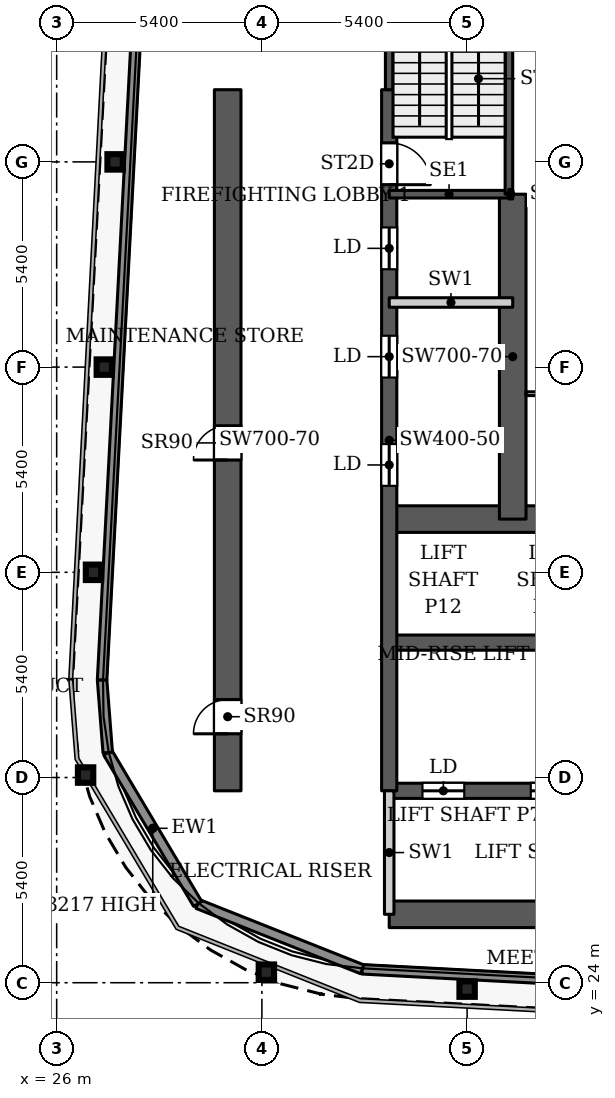
"""IFC4 building model, lengths in metres.
Left out: names, types, materials, properties, quantities, classifications, styles, units other than length and angle.
Written with IfcOpenShell. Run it as: python <this file> out.ifc"""

import sys

from ifc_helpers import new_model, si_unit, direction, frame, frame_2d, origin, origin_2d, place, context, subcontext, project, spatial, rectangle, i_section, extrude, source, transform, mapped, element, fill, save


model = new_model("IFC4")
c1 = context("Model", 3, precision=1e-05, world=origin(), true_north=direction((0.0, 1.0)))
c2 = subcontext(c1, "Body", "Model", "MODEL_VIEW")
j1 = project(units=[si_unit("LENGTHUNIT", "METRE"), si_unit("PLANEANGLEUNIT", "RADIAN")], contexts=[c1])
p1 = place(None, origin())
s1 = spatial("IfcSite", under=j1, at=p1, CompositionType="ELEMENT")
p2 = place(p1, origin())
s2 = spatial("IfcBuilding", under=s1, at=p2, CompositionType="ELEMENT")
p3 = place(p2, frame((0.0, 0.0, 227.9)))
s3 = spatial("IfcBuildingStorey", under=s2, at=p3, CompositionType="ELEMENT", Elevation=227.9)
for number, where, z_axis, x_axis in (
    (1, (36.8, 23.832, 0.0), (0.0, 0.0, 1.0), (1.0, 0.0, 0.0)),
    (2, (31.518, 24.277, 0.0), (0.0, 0.0, 1.0), (1.0, 0.0, 0.0)),
    (3, (26.761, 29.465, 0.0), (0.0, 0.0, 1.0), (1.0, 0.0, 0.0)),
    (4, (26.969, 34.8, 0.0), (0.0, 0.0, 1.0), (1.0, 0.0, 0.0)),
    (5, (27.253, 40.2, 0.0), (0.0, 0.0, 1.0), (1.0, 0.0, 0.0)),
    (6, (27.537, 45.6, 0.0), (0.0, 0.0, 1.0), (1.0, 0.0, 0.0)),
):
    element("IfcColumn", number, at=place(p3, frame(where, z_axis=z_axis, x_axis=x_axis)), inside=s3, PredefinedType="COLUMN", context=c2, shape_type="SweptSolid", body=[
        extrude(i_section(OverallWidth=0.404, OverallDepth=0.407, WebThickness=0.027, FlangeThickness=0.044, FilletRadius=0.012, at=origin_2d()), origin(), (0.0, 0.0, 1.0), 3.9),
    ])
p4 = place(p3, frame((34.75, 25.8, 0.0), z_axis=(0.0, 0.0, 1.0), x_axis=(1.0, 0.0, 0.0)))
e7 = element("IfcWall", 7, at=p4, inside=s3, PredefinedType="SHEAR", context=c2, shape_type="SweptSolid", body=[
    extrude(rectangle(XDim=18.4, YDim=0.7, at=frame_2d((9.2, 0.0))), origin(), (0.0, 0.0, 1.0), 3.9),
])
p5 = place(p3, frame((34.75, 29.05, 0.0), z_axis=(0.0, 0.0, 1.0), x_axis=(1.0, 0.0, 0.0)))
e8 = element("IfcWall", 8, at=p5, inside=s3, PredefinedType="SHEAR", context=c2, shape_type="SweptSolid", body=[
    extrude(rectangle(XDim=18.4, YDim=0.4, at=frame_2d((9.2, 0.0))), origin(), (0.0, 0.0, 1.0), 3.9),
])
p6 = place(p5, frame((0.875, 0.0, 0.0)))
e9 = element("IfcOpeningElement", 9, at=p6, cuts=e8, PredefinedType="OPENING", context=c2, shape_type="SweptSolid", body=[
    extrude(rectangle(XDim=1.1, YDim=2.2, at=frame_2d((0.55, 1.1))), frame((0.0, 0.21, 0.0), z_axis=(0.0, -1.0, 0.0), x_axis=(1.0, 0.0, 0.0)), (0.0, 0.0, 1.0), 0.42),
])
p7 = place(p5, frame((3.725, 0.0, 0.0)))
e10 = element("IfcOpeningElement", 10, at=p7, cuts=e8, PredefinedType="OPENING", context=c2, shape_type="SweptSolid", body=[
    extrude(rectangle(XDim=1.1, YDim=2.2, at=frame_2d((0.55, 1.1))), frame((0.0, 0.21, 0.0), z_axis=(0.0, -1.0, 0.0), x_axis=(1.0, 0.0, 0.0)), (0.0, 0.0, 1.0), 0.42),
])
p8 = place(p5, frame((6.575, 0.0, 0.0)))
e11 = element("IfcOpeningElement", 11, at=p8, cuts=e8, PredefinedType="OPENING", context=c2, shape_type="SweptSolid", body=[
    extrude(rectangle(XDim=1.1, YDim=2.2, at=frame_2d((0.55, 1.1))), frame((0.0, 0.21, 0.0), z_axis=(0.0, -1.0, 0.0), x_axis=(1.0, 0.0, 0.0)), (0.0, 0.0, 1.0), 0.42),
])
p9 = place(p5, frame((9.425, 0.0, 0.0)))
e12 = element("IfcOpeningElement", 12, at=p9, cuts=e8, PredefinedType="OPENING", context=c2, shape_type="SweptSolid", body=[
    extrude(rectangle(XDim=1.1, YDim=2.2, at=frame_2d((0.55, 1.1))), frame((0.0, 0.21, 0.0), z_axis=(0.0, -1.0, 0.0), x_axis=(1.0, 0.0, 0.0)), (0.0, 0.0, 1.0), 0.42),
])
p10 = place(p5, frame((12.275, 0.0, 0.0)))
e13 = element("IfcOpeningElement", 13, at=p10, cuts=e8, PredefinedType="OPENING", context=c2, shape_type="SweptSolid", body=[
    extrude(rectangle(XDim=1.1, YDim=2.2, at=frame_2d((0.55, 1.1))), frame((0.0, 0.21, 0.0), z_axis=(0.0, -1.0, 0.0), x_axis=(1.0, 0.0, 0.0)), (0.0, 0.0, 1.0), 0.42),
])
p11 = place(p5, frame((15.125, 0.0, 0.0)))
e14 = element("IfcOpeningElement", 14, at=p11, cuts=e8, PredefinedType="OPENING", context=c2, shape_type="SweptSolid", body=[
    extrude(rectangle(XDim=1.1, YDim=2.2, at=frame_2d((0.55, 1.1))), frame((0.0, 0.21, 0.0), z_axis=(0.0, -1.0, 0.0), x_axis=(1.0, 0.0, 0.0)), (0.0, 0.0, 1.0), 0.42),
])
p12 = place(p3, frame((34.75, 32.95, 0.0), z_axis=(0.0, 0.0, 1.0), x_axis=(1.0, 0.0, 0.0)))
e15 = element("IfcWall", 15, at=p12, inside=s3, PredefinedType="SHEAR", context=c2, shape_type="SweptSolid", body=[
    extrude(rectangle(XDim=14.25, YDim=0.4, at=frame_2d((7.125, 0.0))), origin(), (0.0, 0.0, 1.0), 3.9),
])
p13 = place(p3, frame((34.75, 36.2, 0.0), z_axis=(0.0, 0.0, 1.0), x_axis=(1.0, 0.0, 0.0)))
e16 = element("IfcWall", 16, at=p13, inside=s3, PredefinedType="SHEAR", context=c2, shape_type="SweptSolid", body=[
    extrude(rectangle(XDim=18.4, YDim=0.7, at=frame_2d((9.2, 0.0))), origin(), (0.0, 0.0, 1.0), 3.9),
])
p14 = place(p13, frame((16.9, 0.0, 0.0)))
e17 = element("IfcOpeningElement", 17, at=p14, cuts=e16, PredefinedType="OPENING", context=c2, shape_type="SweptSolid", body=[
    extrude(rectangle(XDim=1.0, YDim=2.2, at=frame_2d((0.5, 1.1))), frame((0.0, 0.36, 0.0), z_axis=(0.0, -1.0, 0.0), x_axis=(1.0, 0.0, 0.0)), (0.0, 0.0, 1.0), 0.72),
])
p15 = place(p3, frame((34.75, 29.05, 0.0), z_axis=(0.0, 0.0, 1.0), x_axis=(0.0, 1.0, 0.0)))
e18 = element("IfcWall", 18, at=p15, inside=s3, PredefinedType="SHEAR", context=c2, shape_type="SweptSolid", body=[
    extrude(rectangle(XDim=18.45, YDim=0.4, at=frame_2d((9.225, 0.0))), origin(), (0.0, 0.0, 1.0), 3.9),
])
p16 = place(p15, frame((8.025, 0.0, 0.0)))
e19 = element("IfcOpeningElement", 19, at=p16, cuts=e18, PredefinedType="OPENING", context=c2, shape_type="SweptSolid", body=[
    extrude(rectangle(XDim=1.1, YDim=2.2, at=frame_2d((0.55, 1.1))), frame((0.0, 0.21, 0.0), z_axis=(0.0, -1.0, 0.0), x_axis=(1.0, 0.0, 0.0)), (0.0, 0.0, 1.0), 0.42),
])
p17 = place(p15, frame((10.875, 0.0, 0.0)))
e20 = element("IfcOpeningElement", 20, at=p17, cuts=e18, PredefinedType="OPENING", context=c2, shape_type="SweptSolid", body=[
    extrude(rectangle(XDim=1.1, YDim=2.2, at=frame_2d((0.55, 1.1))), frame((0.0, 0.21, 0.0), z_axis=(0.0, -1.0, 0.0), x_axis=(1.0, 0.0, 0.0)), (0.0, 0.0, 1.0), 0.42),
])
p18 = place(p15, frame((13.725, 0.0, 0.0)))
e21 = element("IfcOpeningElement", 21, at=p18, cuts=e18, PredefinedType="OPENING", context=c2, shape_type="SweptSolid", body=[
    extrude(rectangle(XDim=1.1, YDim=2.2, at=frame_2d((0.55, 1.1))), frame((0.0, 0.21, 0.0), z_axis=(0.0, -1.0, 0.0), x_axis=(1.0, 0.0, 0.0)), (0.0, 0.0, 1.0), 0.42),
])
p19 = place(p15, frame((15.95, 0.0, 0.0)))
e22 = element("IfcOpeningElement", 22, at=p19, cuts=e18, PredefinedType="OPENING", context=c2, shape_type="SweptSolid", body=[
    extrude(rectangle(XDim=1.1, YDim=2.2, at=frame_2d((0.55, 1.1))), frame((0.0, 0.21, 0.0), z_axis=(0.0, -1.0, 0.0), x_axis=(1.0, 0.0, 0.0)), (0.0, 0.0, 1.0), 0.42),
])
p20 = place(p3, frame((38.0, 36.2, 0.0), z_axis=(0.0, 0.0, 1.0), x_axis=(0.0, 1.0, 0.0)))
e23 = element("IfcWall", 23, at=p20, inside=s3, PredefinedType="SHEAR", context=c2, shape_type="SweptSolid", body=[
    extrude(rectangle(XDim=8.55, YDim=0.7, at=frame_2d((4.275, 0.0))), origin(), (0.0, 0.0, 1.0), 3.9),
])
p21 = place(p3, frame((30.5, 29.05, 0.0), z_axis=(0.0, 0.0, 1.0), x_axis=(0.0, 1.0, 0.0)))
e24 = element("IfcWall", 24, at=p21, inside=s3, PredefinedType="SHEAR", context=c2, shape_type="SweptSolid", body=[
    extrude(rectangle(XDim=18.45, YDim=0.7, at=frame_2d((9.225, 0.0))), origin(), (0.0, 0.0, 1.0), 3.9),
])
p22 = place(p21, frame((1.5, 0.0, 0.0)))
e25 = element("IfcOpeningElement", 25, at=p22, cuts=e24, PredefinedType="OPENING", context=c2, shape_type="SweptSolid", body=[
    extrude(rectangle(XDim=0.9, YDim=2.2, at=frame_2d((0.45, 1.1))), frame((0.0, 0.36, 0.0), z_axis=(0.0, -1.0, 0.0), x_axis=(1.0, 0.0, 0.0)), (0.0, 0.0, 1.0), 0.72),
])
p23 = place(p21, frame((8.705, 0.0, 0.0)))
e26 = element("IfcOpeningElement", 26, at=p23, cuts=e24, PredefinedType="OPENING", context=c2, shape_type="SweptSolid", body=[
    extrude(rectangle(XDim=0.9, YDim=2.2, at=frame_2d((0.45, 1.1))), frame((0.0, 0.36, 0.0), z_axis=(0.0, -1.0, 0.0), x_axis=(1.0, 0.0, 0.0)), (0.0, 0.0, 1.0), 0.72),
])
p24 = place(p3, frame((84.386, 21.703, 0.0), z_axis=(0.0, 0.0, 1.0), x_axis=(-0.998617508267, 0.05256493302, 0.0)))
e27 = element("IfcWall", 27, at=p24, inside=s3, PredefinedType="SOLIDWALL", context=c2, shape_type="SweptSolid", body=[
    extrude(rectangle(XDim=50.417, YDim=0.25, at=frame_2d((25.208, 0.0))), origin(), (0.0, 0.0, 1.0), 3.75),
])
p25 = place(p3, frame((34.039, 24.353, 0.0), z_axis=(0.0, 0.0, 1.0), x_axis=(-0.929352825399, 0.369192803184, 0.0)))
e28 = element("IfcWall", 28, at=p25, inside=s3, PredefinedType="SOLIDWALL", context=c2, shape_type="SweptSolid", body=[
    extrude(rectangle(XDim=4.656, YDim=0.25, at=frame_2d((2.328, 0.0))), origin(), (0.0, 0.0, 1.0), 3.75),
])
p26 = place(p3, frame((29.712, 26.072, 0.0), z_axis=(0.0, 0.0, 1.0), x_axis=(-0.511028049012, 0.859564036662, 0.0)))
e29 = element("IfcWall", 29, at=p26, inside=s3, PredefinedType="SOLIDWALL", context=c2, shape_type="SweptSolid", body=[
    extrude(rectangle(XDim=4.634, YDim=0.25, at=frame_2d((2.317, 0.0))), origin(), (0.0, 0.0, 1.0), 3.217),
])
p27 = place(p3, frame((27.344, 30.055, 0.0), z_axis=(0.0, 0.0, 1.0), x_axis=(-0.077571675317, 0.99698677784, 0.0)))
e30 = element("IfcWall", 30, at=p27, inside=s3, PredefinedType="SOLIDWALL", context=c2, shape_type="SweptSolid", body=[
    extrude(rectangle(XDim=1.92, YDim=0.25, at=frame_2d((0.96, 0.0))), origin(), (0.0, 0.0, 1.0), 3.75),
])
p28 = place(p3, frame((27.195, 31.969, 0.0), z_axis=(0.0, 0.0, 1.0), x_axis=(0.052555284099, 0.998618016117, 0.0)))
e31 = element("IfcWall", 31, at=p28, inside=s3, PredefinedType="SOLIDWALL", context=c2, shape_type="SweptSolid", body=[
    extrude(rectangle(XDim=61.38, YDim=0.25, at=frame_2d((30.69, 0.0))), origin(), (0.0, 0.0, 1.0), 3.75),
])
p29 = place(p3, frame((34.75, 44.75, 0.0), z_axis=(0.0, 0.0, 1.0), x_axis=(1.0, 0.0, 0.0)))
e32 = element("IfcWall", 32, at=p29, inside=s3, PredefinedType="SHEAR", context=c2, shape_type="SweptSolid", body=[
    extrude(rectangle(XDim=3.15, YDim=0.2, at=frame_2d((1.575, 0.0))), origin(), (0.0, 0.0, 1.0), 3.9),
])
p30 = place(p3, frame((34.75, 47.5, 0.0), z_axis=(0.0, 0.0, 1.0), x_axis=(0.0, 1.0, 0.0)))
e33 = element("IfcWall", 33, at=p30, inside=s3, PredefinedType="SHEAR", context=c2, shape_type="SweptSolid", body=[
    extrude(rectangle(XDim=6.41, YDim=0.2, at=frame_2d((3.205, 0.0))), origin(), (0.0, 0.0, 1.0), 3.9),
])
p31 = place(p3, frame((37.9, 44.75, 0.0), z_axis=(0.0, 0.0, 1.0), x_axis=(0.0, 1.0, 0.0)))
e34 = element("IfcWall", 34, at=p31, inside=s3, PredefinedType="SHEAR", context=c2, shape_type="SweptSolid", body=[
    extrude(rectangle(XDim=9.16, YDim=0.2, at=frame_2d((4.58, 0.0))), origin(), (0.0, 0.0, 1.0), 3.9),
])
for number, where, z_axis, x_axis in (
    (35, (34.75, 25.8, 0.0), (0.0, 0.0, 1.0), (0.0, 1.0, 0.0)),
    (36, (34.75, 41.9, 0.0), (0.0, 0.0, 1.0), (1.0, 0.0, 0.0)),
):
    element("IfcWall", number, at=place(p3, frame(where, z_axis=z_axis, x_axis=x_axis)), inside=s3, PredefinedType="PARTITIONING", context=c2, shape_type="SweptSolid", body=[
        extrude(rectangle(XDim=3.25, YDim=0.25, at=frame_2d((1.625, 0.0))), origin(), (0.0, 0.0, 1.0), 3.9),
    ])
p32 = place(p3, frame((37.9, 44.75, 0.0), z_axis=(0.0, 0.0, 1.0), x_axis=(1.0, 0.0, 0.0)))
e37 = element("IfcWall", 37, at=p32, inside=s3, PredefinedType="PARTITIONING", context=c2, shape_type="SweptSolid", body=[
    extrude(rectangle(XDim=0.1, YDim=0.25, at=frame_2d((0.05, 0.0))), origin(), (0.0, 0.0, 1.0), 3.9),
])
p33 = place(p3, frame((38.349, 39.5, 0.0), z_axis=(0.0, 0.0, 1.0), x_axis=(1.0, 0.0, 0.0)))
e38 = element("IfcWall", 38, at=p33, inside=s3, PredefinedType="PARTITIONING", context=c2, shape_type="SweptSolid", body=[
    extrude(rectangle(XDim=14.951, YDim=0.1, at=frame_2d((7.476, 0.0))), origin(), (0.0, 0.0, 1.0), 3.6),
])
p34 = place(p33, frame((4.147, 0.0, 0.0)))
e39 = element("IfcOpeningElement", 39, at=p34, cuts=e38, PredefinedType="OPENING", context=c2, shape_type="SweptSolid", body=[
    extrude(rectangle(XDim=1.0, YDim=2.1, at=frame_2d((0.5, 1.05))), frame((0.0, 0.06, 0.0), z_axis=(0.0, -1.0, 0.0), x_axis=(1.0, 0.0, 0.0)), (0.0, 0.0, 1.0), 0.12),
])
m1 = source(origin(), c2, "Body", "SweptSolid", [
    extrude(rectangle(XDim=1.1, YDim=2.2, at=frame_2d((0.55, 1.1))), frame((0.0, 0.025, 0.0), z_axis=(0.0, -1.0, 0.0), x_axis=(1.0, 0.0, 0.0)), (0.0, 0.0, 1.0), 0.05),
])
p35 = place(p6, origin())
e40 = element("IfcDoor", 40, at=p35, inside=s3, OperationType="SLIDING_TO_LEFT", PredefinedType="DOOR", context=c2, shape_type="MappedRepresentation", body=[
    mapped(m1, transform((0.0, 0.0, 0.0), x_axis=(1.0, 0.0, 0.0), y_axis=(0.0, 1.0, 0.0), z_axis=(0.0, 0.0, 1.0), scale=1.0)),
])
fill(e9, e40)
p36 = place(p7, origin())
e41 = element("IfcDoor", 41, at=p36, inside=s3, OperationType="SLIDING_TO_LEFT", PredefinedType="DOOR", context=c2, shape_type="MappedRepresentation", body=[
    mapped(m1, transform((0.0, 0.0, 0.0), x_axis=(1.0, 0.0, 0.0), y_axis=(0.0, 1.0, 0.0), z_axis=(0.0, 0.0, 1.0), scale=1.0)),
])
fill(e10, e41)
p37 = place(p16, origin())
e42 = element("IfcDoor", 42, at=p37, inside=s3, OperationType="SLIDING_TO_LEFT", PredefinedType="DOOR", context=c2, shape_type="MappedRepresentation", body=[
    mapped(m1, transform((0.0, 0.0, 0.0), x_axis=(1.0, 0.0, 0.0), y_axis=(0.0, 1.0, 0.0), z_axis=(0.0, 0.0, 1.0), scale=1.0)),
])
fill(e19, e42)
p38 = place(p17, origin())
e43 = element("IfcDoor", 43, at=p38, inside=s3, OperationType="SLIDING_TO_LEFT", PredefinedType="DOOR", context=c2, shape_type="MappedRepresentation", body=[
    mapped(m1, transform((0.0, 0.0, 0.0), x_axis=(1.0, 0.0, 0.0), y_axis=(0.0, 1.0, 0.0), z_axis=(0.0, 0.0, 1.0), scale=1.0)),
])
fill(e20, e43)
p39 = place(p18, origin())
e44 = element("IfcDoor", 44, at=p39, inside=s3, OperationType="SLIDING_TO_LEFT", PredefinedType="DOOR", context=c2, shape_type="MappedRepresentation", body=[
    mapped(m1, transform((0.0, 0.0, 0.0), x_axis=(1.0, 0.0, 0.0), y_axis=(0.0, 1.0, 0.0), z_axis=(0.0, 0.0, 1.0), scale=1.0)),
])
fill(e21, e44)
m2 = source(origin(), c2, "Body", "SweptSolid", [
    extrude(rectangle(XDim=0.9, YDim=2.2, at=frame_2d((0.45, 1.1))), frame((0.0, 0.025, 0.0), z_axis=(0.0, -1.0, 0.0), x_axis=(1.0, 0.0, 0.0)), (0.0, 0.0, 1.0), 0.05),
])
p40 = place(p22, origin())
e45 = element("IfcDoor", 45, at=p40, inside=s3, OperationType="SINGLE_SWING_LEFT", PredefinedType="DOOR", context=c2, shape_type="MappedRepresentation", body=[
    mapped(m2, transform((0.0, 0.0, 0.0), x_axis=(1.0, 0.0, 0.0), y_axis=(0.0, 1.0, 0.0), z_axis=(0.0, 0.0, 1.0), scale=1.0)),
])
fill(e25, e45)
p41 = place(p23, origin())
e46 = element("IfcDoor", 46, at=p41, inside=s3, OperationType="SINGLE_SWING_LEFT", PredefinedType="DOOR", context=c2, shape_type="MappedRepresentation", body=[
    mapped(m2, transform((0.0, 0.0, 0.0), x_axis=(1.0, 0.0, 0.0), y_axis=(0.0, 1.0, 0.0), z_axis=(0.0, 0.0, 1.0), scale=1.0)),
])
fill(e26, e46)
m3 = source(origin(), c2, "Body", "SweptSolid", [
    extrude(rectangle(XDim=1.1, YDim=2.2, at=frame_2d((0.55, 1.1))), frame((0.0, 0.025, 0.0), z_axis=(0.0, -1.0, 0.0), x_axis=(1.0, 0.0, 0.0)), (0.0, 0.0, 1.0), 0.05),
])
p42 = place(p19, origin())
e47 = element("IfcDoor", 47, at=p42, inside=s3, OperationType="SINGLE_SWING_RIGHT", PredefinedType="DOOR", context=c2, shape_type="MappedRepresentation", body=[
    mapped(m3, transform((0.0, 0.0, 0.0), x_axis=(1.0, 0.0, 0.0), y_axis=(0.0, 1.0, 0.0), z_axis=(0.0, 0.0, 1.0), scale=1.0)),
])
fill(e22, e47)
save(model, sys.argv[1])
